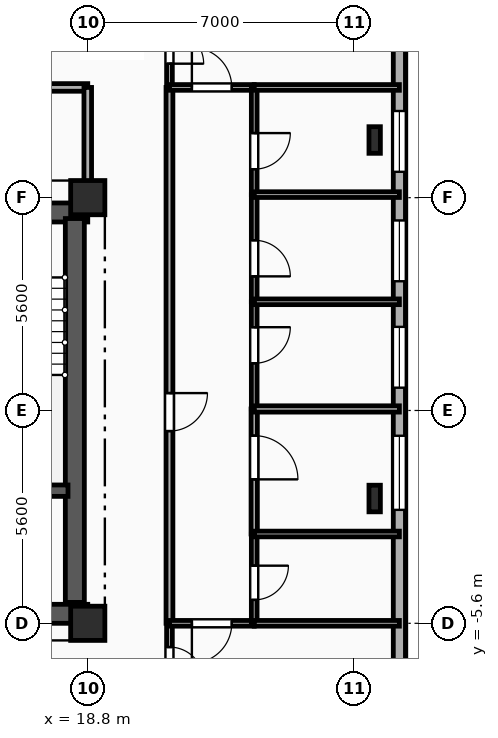
"""IFC4 building model, lengths in metres.
Left out: names, types, materials, properties, quantities, classifications, styles, units other than length and angle.
Written with IfcOpenShell. Run it as: python <this file> out.ifc"""

import sys

from ifc_helpers import new_model, si_unit, direction, frame, frame_2d, origin, origin_2d, place, context, subcontext, project, spatial, rectangle, i_section, extrude, element, fill, save


model = new_model("IFC4")
c1 = context("Model", 3, precision=1e-05, world=origin(), true_north=direction((0.0, 1.0)))
c2 = subcontext(c1, "Body", "Model", "MODEL_VIEW")
j1 = project(units=[si_unit("LENGTHUNIT", "METRE"), si_unit("PLANEANGLEUNIT", "RADIAN")], contexts=[c1])
p1 = place(None, origin())
s1 = spatial("IfcSite", under=j1, at=p1, CompositionType="ELEMENT")
p2 = place(p1, origin())
s2 = spatial("IfcBuilding", under=s1, at=p2, CompositionType="ELEMENT")
p3 = place(p2, frame((0.0, 0.0, 134.35)))
s3 = spatial("IfcBuildingStorey", under=s2, at=p3, CompositionType="ELEMENT", Elevation=134.35)
for number, where, z_axis, x_axis in (
    (1, (18.8, -5.6, 0.0), (0.0, 0.0, 1.0), (1.0, 0.0, 0.0)),
    (2, (18.8, 5.6, 0.0), (0.0, 0.0, 1.0), (1.0, 0.0, 0.0)),
):
    element("IfcColumn", number, at=place(p3, frame(where, z_axis=z_axis, x_axis=x_axis)), inside=s3, PredefinedType="COLUMN", context=c2, shape_type="SweptSolid", body=[
        extrude(rectangle(XDim=0.9, YDim=0.9, at=origin_2d()), origin(), (0.0, 0.0, 1.0), 3.35),
    ])
for number, where, z_axis, x_axis in (
    (3, (26.35, -2.317, 0.0), (0.0, 0.0, 1.0), (1.0, 0.0, 0.0)),
    (4, (26.35, 7.117, 0.0), (0.0, 0.0, 1.0), (1.0, 0.0, 0.0)),
):
    element("IfcColumn", number, at=place(p3, frame(where, z_axis=z_axis, x_axis=x_axis)), inside=s3, PredefinedType="COLUMN", context=c2, shape_type="SweptSolid", body=[
        extrude(i_section(OverallWidth=0.3, OverallDepth=0.7, WebThickness=0.017, FlangeThickness=0.032, FilletRadius=0.027, at=origin_2d()), origin(), (0.0, 0.0, 1.0), 3.35),
    ])
p4 = place(p3, frame((27.0, 17.2, 0.0), z_axis=(0.0, 0.0, 1.0), x_axis=(0.0, -1.0, 0.0)))
e5 = element("IfcWall", 5, at=p4, inside=s3, PredefinedType="SOLIDWALL", context=c2, shape_type="SweptSolid", body=[
    extrude(rectangle(XDim=29.6, YDim=0.32, at=frame_2d((14.8, 0.0))), origin(), (0.0, 0.0, 1.0), 3.04),
])
p5 = place(p4, frame((3.775, 0.0, 0.85)))
e6 = element("IfcOpeningElement", 6, at=p5, cuts=e5, PredefinedType="OPENING", context=c2, shape_type="SweptSolid", body=[
    extrude(rectangle(XDim=1.65, YDim=1.85, at=frame_2d((0.825, 0.925))), frame((0.0, 0.17, 0.0), z_axis=(0.0, -1.0, 0.0), x_axis=(1.0, 0.0, 0.0)), (0.0, 0.0, 1.0), 0.34),
])
p6 = place(p4, frame((9.32, 0.0, 0.85)))
e7 = element("IfcOpeningElement", 7, at=p6, cuts=e5, PredefinedType="OPENING", context=c2, shape_type="SweptSolid", body=[
    extrude(rectangle(XDim=1.6, YDim=1.85, at=frame_2d((0.8, 0.925))), frame((0.0, 0.17, 0.0), z_axis=(0.0, -1.0, 0.0), x_axis=(1.0, 0.0, 0.0)), (0.0, 0.0, 1.0), 0.34),
])
p7 = place(p4, frame((12.2, 0.0, 0.85)))
e8 = element("IfcOpeningElement", 8, at=p7, cuts=e5, PredefinedType="OPENING", context=c2, shape_type="SweptSolid", body=[
    extrude(rectangle(XDim=1.6, YDim=1.85, at=frame_2d((0.8, 0.925))), frame((0.0, 0.17, 0.0), z_axis=(0.0, -1.0, 0.0), x_axis=(1.0, 0.0, 0.0)), (0.0, 0.0, 1.0), 0.34),
])
p8 = place(p4, frame((15.0, 0.0, 0.85)))
e9 = element("IfcOpeningElement", 9, at=p8, cuts=e5, PredefinedType="OPENING", context=c2, shape_type="SweptSolid", body=[
    extrude(rectangle(XDim=1.6, YDim=1.85, at=frame_2d((0.8, 0.925))), frame((0.0, 0.17, 0.0), z_axis=(0.0, -1.0, 0.0), x_axis=(1.0, 0.0, 0.0)), (0.0, 0.0, 1.0), 0.34),
])
p9 = place(p4, frame((17.865, 0.0, 0.85)))
e10 = element("IfcOpeningElement", 10, at=p9, cuts=e5, PredefinedType="OPENING", context=c2, shape_type="SweptSolid", body=[
    extrude(rectangle(XDim=1.95, YDim=1.85, at=frame_2d((0.975, 0.925))), frame((0.0, 0.17, 0.0), z_axis=(0.0, -1.0, 0.0), x_axis=(1.0, 0.0, 0.0)), (0.0, 0.0, 1.0), 0.34),
])
p10 = place(p4, frame((25.175, 0.0, 0.85)))
e11 = element("IfcOpeningElement", 11, at=p10, cuts=e5, PredefinedType="OPENING", context=c2, shape_type="SweptSolid", body=[
    extrude(rectangle(XDim=1.65, YDim=1.85, at=frame_2d((0.825, 0.925))), frame((0.0, 0.17, 0.0), z_axis=(0.0, -1.0, 0.0), x_axis=(1.0, 0.0, 0.0)), (0.0, 0.0, 1.0), 0.34),
])
p11 = place(p3, frame((9.2, 5.21, 0.0), z_axis=(0.0, 0.0, 1.0), x_axis=(1.0, 0.0, 0.0)))
e12 = element("IfcWall", 12, at=p11, inside=s3, PredefinedType="SHEAR", context=c2, shape_type="SweptSolid", body=[
    extrude(rectangle(XDim=9.6, YDim=0.5, at=frame_2d((4.8, 0.0))), origin(), (0.0, 0.0, 1.0), 3.04),
])
p12 = place(p11, frame((6.95, 0.0, 0.0)))
e13 = element("IfcOpeningElement", 13, at=p12, cuts=e12, PredefinedType="OPENING", context=c2, shape_type="SweptSolid", body=[
    extrude(rectangle(XDim=1.1, YDim=2.15, at=frame_2d((0.55, 1.075))), frame((0.0, 0.26, 0.0), z_axis=(0.0, -1.0, 0.0), x_axis=(1.0, 0.0, 0.0)), (0.0, 0.0, 1.0), 0.52),
])
p13 = place(p11, frame((3.775, 0.0, 0.0)))
e14 = element("IfcOpeningElement", 14, at=p13, cuts=e12, PredefinedType="OPENING", context=c2, shape_type="SweptSolid", body=[
    extrude(rectangle(XDim=1.05, YDim=2.1, at=frame_2d((0.525, 1.05))), frame((0.0, 0.26, 0.0), z_axis=(0.0, -1.0, 0.0), x_axis=(1.0, 0.0, 0.0)), (0.0, 0.0, 1.0), 0.52),
])
p14 = place(p3, frame((9.2, -5.35, 0.0), z_axis=(0.0, 0.0, 1.0), x_axis=(1.0, 0.0, 0.0)))
e15 = element("IfcWall", 15, at=p14, inside=s3, PredefinedType="SHEAR", context=c2, shape_type="SweptSolid", body=[
    extrude(rectangle(XDim=9.6, YDim=0.5, at=frame_2d((4.8, 0.0))), origin(), (0.0, 0.0, 1.0), 3.04),
])
p15 = place(p14, frame((7.65, 0.0, 0.0)))
e16 = element("IfcOpeningElement", 16, at=p15, cuts=e15, PredefinedType="OPENING", context=c2, shape_type="SweptSolid", body=[
    extrude(rectangle(XDim=0.9, YDim=2.1, at=frame_2d((0.45, 1.05))), frame((0.0, 0.26, 0.0), z_axis=(0.0, -1.0, 0.0), x_axis=(1.0, 0.0, 0.0)), (0.0, 0.0, 1.0), 0.52),
])
p16 = place(p3, frame((18.46, -5.05, 0.0), z_axis=(0.0, 0.0, 1.0), x_axis=(0.0, 1.0, 0.0)))
e17 = element("IfcWall", 17, at=p16, inside=s3, PredefinedType="SHEAR", context=c2, shape_type="SweptSolid", body=[
    extrude(rectangle(XDim=10.1, YDim=0.5, at=frame_2d((5.05, 0.0))), origin(), (0.0, 0.0, 1.0), 3.04),
])
p17 = place(p3, frame((15.1, -2.11, 0.0), z_axis=(0.0, 0.0, 1.0), x_axis=(1.0, 0.0, 0.0)))
e18 = element("IfcWall", 18, at=p17, inside=s3, PredefinedType="SHEAR", context=c2, shape_type="SweptSolid", body=[
    extrude(rectangle(XDim=3.18, YDim=0.3, at=frame_2d((1.59, 0.0))), origin(), (0.0, 0.0, 1.0), 3.04),
])
p18 = place(p3, frame((18.8, 8.5, 0.0), z_axis=(0.0, 0.0, 1.0), x_axis=(-1.0, 0.0, 0.0)))
e19 = element("IfcWall", 19, at=p18, inside=s3, PredefinedType="PARTITIONING", context=c2, shape_type="SweptSolid", body=[
    extrude(rectangle(XDim=6.8, YDim=0.2, at=frame_2d((3.4, 0.0))), origin(), (0.0, 0.0, 1.0), 3.04),
])
p19 = place(p18, frame((3.985, 0.0, 0.0)))
e20 = element("IfcOpeningElement", 20, at=p19, cuts=e19, PredefinedType="OPENING", context=c2, shape_type="SweptSolid", body=[
    extrude(rectangle(XDim=1.1, YDim=2.15, at=frame_2d((0.55, 1.075))), frame((0.0, 0.11, 0.0), z_axis=(0.0, -1.0, 0.0), x_axis=(1.0, 0.0, 0.0)), (0.0, 0.0, 1.0), 0.22),
])
p20 = place(p3, frame((18.8, 5.6, 0.0), z_axis=(0.0, 0.0, 1.0), x_axis=(0.0, 1.0, 0.0)))
e21 = element("IfcWall", 21, at=p20, inside=s3, PredefinedType="PARTITIONING", context=c2, shape_type="SweptSolid", body=[
    extrude(rectangle(XDim=2.9, YDim=0.2, at=frame_2d((1.45, 0.0))), origin(), (0.0, 0.0, 1.0), 2.525),
])
p21 = place(p3, frame((20.95, 10.65, 0.0), z_axis=(0.0, 0.0, 1.0), x_axis=(0.0, -1.0, 0.0)))
e22 = element("IfcWall", 22, at=p21, inside=s3, PredefinedType="PARTITIONING", context=c2, shape_type="SweptSolid", body=[
    extrude(rectangle(XDim=2.15, YDim=0.15, at=frame_2d((1.075, 0.0))), origin(), (0.0, 0.0, 1.0), 3.04),
])
p22 = place(p21, frame((0.625, 0.0, 0.0)))
e23 = element("IfcOpeningElement", 23, at=p22, cuts=e22, PredefinedType="OPENING", context=c2, shape_type="SweptSolid", body=[
    extrude(rectangle(XDim=0.9, YDim=2.1, at=frame_2d((0.45, 1.05))), frame((0.0, 0.085, 0.0), z_axis=(0.0, -1.0, 0.0), x_axis=(1.0, 0.0, 0.0)), (0.0, 0.0, 1.0), 0.17),
])
p23 = place(p3, frame((20.95, -5.6, 0.0), z_axis=(0.0, 0.0, 1.0), x_axis=(0.0, -1.0, 0.0)))
e24 = element("IfcWall", 24, at=p23, inside=s3, PredefinedType="PARTITIONING", context=c2, shape_type="SweptSolid", body=[
    extrude(rectangle(XDim=2.15, YDim=0.15, at=frame_2d((1.075, 0.0))), origin(), (0.0, 0.0, 1.0), 3.04),
])
p24 = place(p23, frame((0.625, 0.0, 0.0)))
e25 = element("IfcOpeningElement", 25, at=p24, cuts=e24, PredefinedType="OPENING", context=c2, shape_type="SweptSolid", body=[
    extrude(rectangle(XDim=0.9, YDim=2.1, at=frame_2d((0.45, 1.05))), frame((0.0, 0.085, 0.0), z_axis=(0.0, -1.0, 0.0), x_axis=(1.0, 0.0, 0.0)), (0.0, 0.0, 1.0), 0.17),
])
p25 = place(p3, frame((20.95, 8.5, 0.0), z_axis=(0.0, 0.0, 1.0), x_axis=(0.0, -1.0, 0.0)))
e26 = element("IfcWall", 26, at=p25, inside=s3, PredefinedType="PARTITIONING", context=c2, shape_type="SweptSolid", body=[
    extrude(rectangle(XDim=14.1, YDim=0.18, at=frame_2d((7.05, 0.0))), origin(), (0.0, 0.0, 1.0), 3.04),
])
p26 = place(p25, frame((8.042, 0.0, 0.0)))
e27 = element("IfcOpeningElement", 27, at=p26, cuts=e26, PredefinedType="OPENING", context=c2, shape_type="SweptSolid", body=[
    extrude(rectangle(XDim=1.0, YDim=2.15, at=frame_2d((0.5, 1.075))), frame((0.0, 0.1, 0.0), z_axis=(0.0, -1.0, 0.0), x_axis=(1.0, 0.0, 0.0)), (0.0, 0.0, 1.0), 0.2),
])
p27 = place(p3, frame((20.95, 8.5, 0.0), z_axis=(0.0, 0.0, 1.0), x_axis=(1.0, 0.0, 0.0)))
e28 = element("IfcWall", 28, at=p27, inside=s3, PredefinedType="PARTITIONING", context=c2, shape_type="SweptSolid", body=[
    extrude(rectangle(XDim=2.23, YDim=0.15, at=frame_2d((1.115, 0.0))), origin(), (0.0, 0.0, 1.0), 3.04),
])
p28 = place(p27, frame((0.59, 0.0, 0.0)))
e29 = element("IfcOpeningElement", 29, at=p28, cuts=e28, PredefinedType="OPENING", context=c2, shape_type="SweptSolid", body=[
    extrude(rectangle(XDim=1.05, YDim=2.15, at=frame_2d((0.525, 1.075))), frame((0.0, 0.085, 0.0), z_axis=(0.0, -1.0, 0.0), x_axis=(1.0, 0.0, 0.0)), (0.0, 0.0, 1.0), 0.17),
])
p29 = place(p3, frame((23.18, -5.6, 0.0), z_axis=(0.0, 0.0, 1.0), x_axis=(-1.0, 0.0, 0.0)))
e30 = element("IfcWall", 30, at=p29, inside=s3, PredefinedType="PARTITIONING", context=c2, shape_type="SweptSolid", body=[
    extrude(rectangle(XDim=2.23, YDim=0.15, at=frame_2d((1.115, 0.0))), origin(), (0.0, 0.0, 1.0), 3.04),
])
p30 = place(p29, frame((0.59, 0.0, 0.0)))
e31 = element("IfcOpeningElement", 31, at=p30, cuts=e30, PredefinedType="OPENING", context=c2, shape_type="SweptSolid", body=[
    extrude(rectangle(XDim=1.05, YDim=2.15, at=frame_2d((0.525, 1.075))), frame((0.0, 0.085, 0.0), z_axis=(0.0, -1.0, 0.0), x_axis=(1.0, 0.0, 0.0)), (0.0, 0.0, 1.0), 0.17),
])
p31 = place(p3, frame((23.18, -3.25, 0.0), z_axis=(0.0, 0.0, 1.0), x_axis=(0.0, -1.0, 0.0)))
e32 = element("IfcWall", 32, at=p31, inside=s3, PredefinedType="PLUMBINGWALL", context=c2, shape_type="SweptSolid", body=[
    extrude(rectangle(XDim=2.35, YDim=0.15, at=frame_2d((1.175, 0.0))), origin(), (0.0, 0.0, 1.0), 3.04),
])
p32 = place(p31, frame((0.834, 0.0, 0.0)))
e33 = element("IfcOpeningElement", 33, at=p32, cuts=e32, PredefinedType="OPENING", context=c2, shape_type="SweptSolid", body=[
    extrude(rectangle(XDim=0.9, YDim=2.1, at=frame_2d((0.45, 1.05))), frame((0.0, 0.085, 0.0), z_axis=(0.0, -1.0, 0.0), x_axis=(1.0, 0.0, 0.0)), (0.0, 0.0, 1.0), 0.17),
])
p33 = place(p3, frame((23.18, 0.04, 0.0), z_axis=(0.0, 0.0, 1.0), x_axis=(0.0, -1.0, 0.0)))
e34 = element("IfcWall", 34, at=p33, inside=s3, PredefinedType="PARTITIONING", context=c2, shape_type="SweptSolid", body=[
    extrude(rectangle(XDim=3.29, YDim=0.165, at=frame_2d((1.645, 0.0))), origin(), (0.0, 0.0, 1.0), 3.04),
])
p34 = place(p33, frame((0.702, 0.0, 0.0)))
e35 = element("IfcOpeningElement", 35, at=p34, cuts=e34, PredefinedType="OPENING", context=c2, shape_type="SweptSolid", body=[
    extrude(rectangle(XDim=1.15, YDim=2.15, at=frame_2d((0.575, 1.075))), frame((0.0, 0.093, 0.0), z_axis=(0.0, -1.0, 0.0), x_axis=(1.0, 0.0, 0.0)), (0.0, 0.0, 1.0), 0.185),
])
p35 = place(p3, frame((23.18, 2.86, 0.0), z_axis=(0.0, 0.0, 1.0), x_axis=(0.0, -1.0, 0.0)))
e36 = element("IfcWall", 36, at=p35, inside=s3, PredefinedType="PARTITIONING", context=c2, shape_type="SweptSolid", body=[
    extrude(rectangle(XDim=2.82, YDim=0.15, at=frame_2d((1.41, 0.0))), origin(), (0.0, 0.0, 1.0), 3.04),
])
p36 = place(p35, frame((0.669, 0.0, 0.0)))
e37 = element("IfcOpeningElement", 37, at=p36, cuts=e36, PredefinedType="OPENING", context=c2, shape_type="SweptSolid", body=[
    extrude(rectangle(XDim=0.95, YDim=2.1, at=frame_2d((0.475, 1.05))), frame((0.0, 0.085, 0.0), z_axis=(0.0, -1.0, 0.0), x_axis=(1.0, 0.0, 0.0)), (0.0, 0.0, 1.0), 0.17),
])
p37 = place(p3, frame((23.18, 5.68, 0.0), z_axis=(0.0, 0.0, 1.0), x_axis=(0.0, -1.0, 0.0)))
e38 = element("IfcWall", 38, at=p37, inside=s3, PredefinedType="PARTITIONING", context=c2, shape_type="SweptSolid", body=[
    extrude(rectangle(XDim=2.82, YDim=0.15, at=frame_2d((1.41, 0.0))), origin(), (0.0, 0.0, 1.0), 3.04),
])
p38 = place(p37, frame((1.201, 0.0, 0.0)))
e39 = element("IfcOpeningElement", 39, at=p38, cuts=e38, PredefinedType="OPENING", context=c2, shape_type="SweptSolid", body=[
    extrude(rectangle(XDim=0.95, YDim=2.1, at=frame_2d((0.475, 1.05))), frame((0.0, 0.085, 0.0), z_axis=(0.0, -1.0, 0.0), x_axis=(1.0, 0.0, 0.0)), (0.0, 0.0, 1.0), 0.17),
])
p39 = place(p3, frame((23.18, 8.5, 0.0), z_axis=(0.0, 0.0, 1.0), x_axis=(0.0, -1.0, 0.0)))
e40 = element("IfcWall", 40, at=p39, inside=s3, PredefinedType="PARTITIONING", context=c2, shape_type="SweptSolid", body=[
    extrude(rectangle(XDim=2.82, YDim=0.15, at=frame_2d((1.41, 0.0))), origin(), (0.0, 0.0, 1.0), 3.04),
])
p40 = place(p39, frame((1.201, 0.0, 0.0)))
e41 = element("IfcOpeningElement", 41, at=p40, cuts=e40, PredefinedType="OPENING", context=c2, shape_type="SweptSolid", body=[
    extrude(rectangle(XDim=0.95, YDim=2.1, at=frame_2d((0.475, 1.05))), frame((0.0, 0.085, 0.0), z_axis=(0.0, -1.0, 0.0), x_axis=(1.0, 0.0, 0.0)), (0.0, 0.0, 1.0), 0.17),
])
p41 = place(p3, frame((27.0, 8.5, 0.0), z_axis=(0.0, 0.0, 1.0), x_axis=(-1.0, 0.0, 0.0)))
e42 = element("IfcWall", 42, at=p41, inside=s3, PredefinedType="PARTITIONING", context=c2, shape_type="SweptSolid", body=[
    extrude(rectangle(XDim=3.82, YDim=0.15, at=frame_2d((1.91, 0.0))), origin(), (0.0, 0.0, 1.0), 3.04),
])
for number, where, z_axis, x_axis in (
    (43, (23.18, -5.6, 0.0), (0.0, 0.0, 1.0), (1.0, 0.0, 0.0)),
    (44, (23.18, -3.25, 0.0), (0.0, 0.0, 1.0), (1.0, 0.0, 0.0)),
):
    element("IfcWall", number, at=place(p3, frame(where, z_axis=z_axis, x_axis=x_axis)), inside=s3, PredefinedType="PLUMBINGWALL", context=c2, shape_type="SweptSolid", body=[
        extrude(rectangle(XDim=3.82, YDim=0.15, at=frame_2d((1.91, 0.0))), origin(), (0.0, 0.0, 1.0), 3.04),
    ])
p42 = place(p3, frame((23.18, 0.04, 0.0), z_axis=(0.0, 0.0, 1.0), x_axis=(1.0, 0.0, 0.0)))
e45 = element("IfcWall", 45, at=p42, inside=s3, PredefinedType="PARTITIONING", context=c2, shape_type="SweptSolid", body=[
    extrude(rectangle(XDim=3.82, YDim=0.165, at=frame_2d((1.91, 0.0))), origin(), (0.0, 0.0, 1.0), 3.04),
])
for number, where, z_axis, x_axis in (
    (46, (23.18, 2.86, 0.0), (0.0, 0.0, 1.0), (1.0, 0.0, 0.0)),
    (47, (23.18, 5.68, 0.0), (0.0, 0.0, 1.0), (1.0, 0.0, 0.0)),
):
    element("IfcWall", number, at=place(p3, frame(where, z_axis=z_axis, x_axis=x_axis)), inside=s3, PredefinedType="PARTITIONING", context=c2, shape_type="SweptSolid", body=[
        extrude(rectangle(XDim=3.82, YDim=0.15, at=frame_2d((1.91, 0.0))), origin(), (0.0, 0.0, 1.0), 3.04),
    ])
p43 = place(p6, origin())
e48 = element("IfcWindow", 48, at=p43, inside=s3, PartitioningType="SINGLE_PANEL", PredefinedType="WINDOW", context=c2, shape_type="SweptSolid", body=[
    extrude(rectangle(XDim=1.6, YDim=1.85, at=frame_2d((0.8, 0.925))), frame((0.0, 0.03, 0.0), z_axis=(0.0, -1.0, 0.0), x_axis=(1.0, 0.0, 0.0)), (0.0, 0.0, 1.0), 0.06),
])
fill(e7, e48)
p44 = place(p7, origin())
e49 = element("IfcWindow", 49, at=p44, inside=s3, PartitioningType="SINGLE_PANEL", PredefinedType="WINDOW", context=c2, shape_type="SweptSolid", body=[
    extrude(rectangle(XDim=1.6, YDim=1.85, at=frame_2d((0.8, 0.925))), frame((0.0, 0.03, 0.0), z_axis=(0.0, -1.0, 0.0), x_axis=(1.0, 0.0, 0.0)), (0.0, 0.0, 1.0), 0.06),
])
fill(e8, e49)
p45 = place(p8, origin())
e50 = element("IfcWindow", 50, at=p45, inside=s3, PartitioningType="SINGLE_PANEL", PredefinedType="WINDOW", context=c2, shape_type="SweptSolid", body=[
    extrude(rectangle(XDim=1.6, YDim=1.85, at=frame_2d((0.8, 0.925))), frame((0.0, 0.03, 0.0), z_axis=(0.0, -1.0, 0.0), x_axis=(1.0, 0.0, 0.0)), (0.0, 0.0, 1.0), 0.06),
])
fill(e9, e50)
p46 = place(p9, origin())
e51 = element("IfcWindow", 51, at=p46, inside=s3, PartitioningType="SINGLE_PANEL", PredefinedType="WINDOW", context=c2, shape_type="SweptSolid", body=[
    extrude(rectangle(XDim=1.95, YDim=1.85, at=frame_2d((0.975, 0.925))), frame((0.0, 0.03, 0.0), z_axis=(0.0, -1.0, 0.0), x_axis=(1.0, 0.0, 0.0)), (0.0, 0.0, 1.0), 0.06),
])
fill(e10, e51)
p47 = place(p22, origin())
e52 = element("IfcDoor", 52, at=p47, inside=s3, OperationType="SINGLE_SWING_RIGHT", PredefinedType="DOOR", context=c2, shape_type="SweptSolid", body=[
    extrude(rectangle(XDim=0.9, YDim=2.1, at=frame_2d((0.45, 1.05))), frame((0.0, 0.025, 0.0), z_axis=(0.0, -1.0, 0.0), x_axis=(1.0, 0.0, 0.0)), (0.0, 0.0, 1.0), 0.05),
])
fill(e23, e52)
p48 = place(p24, origin())
e53 = element("IfcDoor", 53, at=p48, inside=s3, OperationType="SINGLE_SWING_RIGHT", PredefinedType="DOOR", context=c2, shape_type="SweptSolid", body=[
    extrude(rectangle(XDim=0.9, YDim=2.1, at=frame_2d((0.45, 1.05))), frame((0.0, 0.025, 0.0), z_axis=(0.0, -1.0, 0.0), x_axis=(1.0, 0.0, 0.0)), (0.0, 0.0, 1.0), 0.05),
])
fill(e25, e53)
p49 = place(p26, origin())
e54 = element("IfcDoor", 54, at=p49, inside=s3, OperationType="SINGLE_SWING_LEFT", PredefinedType="DOOR", context=c2, shape_type="SweptSolid", body=[
    extrude(rectangle(XDim=1.0, YDim=2.15, at=frame_2d((0.5, 1.075))), frame((0.0, 0.025, 0.0), z_axis=(0.0, -1.0, 0.0), x_axis=(1.0, 0.0, 0.0)), (0.0, 0.0, 1.0), 0.05),
])
fill(e27, e54)
p50 = place(p28, origin())
e55 = element("IfcDoor", 55, at=p50, inside=s3, OperationType="SINGLE_SWING_LEFT", PredefinedType="DOOR", context=c2, shape_type="SweptSolid", body=[
    extrude(rectangle(XDim=1.05, YDim=2.15, at=frame_2d((0.525, 1.075))), frame((0.0, 0.025, 0.0), z_axis=(0.0, -1.0, 0.0), x_axis=(1.0, 0.0, 0.0)), (0.0, 0.0, 1.0), 0.05),
])
fill(e29, e55)
p51 = place(p30, origin())
e56 = element("IfcDoor", 56, at=p51, inside=s3, OperationType="SINGLE_SWING_RIGHT", PredefinedType="DOOR", context=c2, shape_type="SweptSolid", body=[
    extrude(rectangle(XDim=1.05, YDim=2.15, at=frame_2d((0.525, 1.075))), frame((0.0, 0.025, 0.0), z_axis=(0.0, -1.0, 0.0), x_axis=(1.0, 0.0, 0.0)), (0.0, 0.0, 1.0), 0.05),
])
fill(e31, e56)
p52 = place(p32, origin())
e57 = element("IfcDoor", 57, at=p52, inside=s3, OperationType="SINGLE_SWING_LEFT", PredefinedType="DOOR", context=c2, shape_type="SweptSolid", body=[
    extrude(rectangle(XDim=0.9, YDim=2.1, at=frame_2d((0.45, 1.05))), frame((0.0, 0.025, 0.0), z_axis=(0.0, -1.0, 0.0), x_axis=(1.0, 0.0, 0.0)), (0.0, 0.0, 1.0), 0.05),
])
fill(e33, e57)
p53 = place(p34, origin())
e58 = element("IfcDoor", 58, at=p53, inside=s3, OperationType="SINGLE_SWING_RIGHT", PredefinedType="DOOR", context=c2, shape_type="SweptSolid", body=[
    extrude(rectangle(XDim=1.15, YDim=2.15, at=frame_2d((0.575, 1.075))), frame((0.0, 0.025, 0.0), z_axis=(0.0, -1.0, 0.0), x_axis=(1.0, 0.0, 0.0)), (0.0, 0.0, 1.0), 0.05),
])
fill(e35, e58)
p54 = place(p36, origin())
e59 = element("IfcDoor", 59, at=p54, inside=s3, OperationType="SINGLE_SWING_LEFT", PredefinedType="DOOR", context=c2, shape_type="SweptSolid", body=[
    extrude(rectangle(XDim=0.95, YDim=2.1, at=frame_2d((0.475, 1.05))), frame((0.0, 0.025, 0.0), z_axis=(0.0, -1.0, 0.0), x_axis=(1.0, 0.0, 0.0)), (0.0, 0.0, 1.0), 0.05),
])
fill(e37, e59)
p55 = place(p38, origin())
e60 = element("IfcDoor", 60, at=p55, inside=s3, OperationType="SINGLE_SWING_RIGHT", PredefinedType="DOOR", context=c2, shape_type="SweptSolid", body=[
    extrude(rectangle(XDim=0.95, YDim=2.1, at=frame_2d((0.475, 1.05))), frame((0.0, 0.025, 0.0), z_axis=(0.0, -1.0, 0.0), x_axis=(1.0, 0.0, 0.0)), (0.0, 0.0, 1.0), 0.05),
])
fill(e39, e60)
p56 = place(p40, origin())
e61 = element("IfcDoor", 61, at=p56, inside=s3, OperationType="SINGLE_SWING_LEFT", PredefinedType="DOOR", context=c2, shape_type="SweptSolid", body=[
    extrude(rectangle(XDim=0.95, YDim=2.1, at=frame_2d((0.475, 1.05))), frame((0.0, 0.025, 0.0), z_axis=(0.0, -1.0, 0.0), x_axis=(1.0, 0.0, 0.0)), (0.0, 0.0, 1.0), 0.05),
])
fill(e41, e61)
save(model, sys.argv[1])
